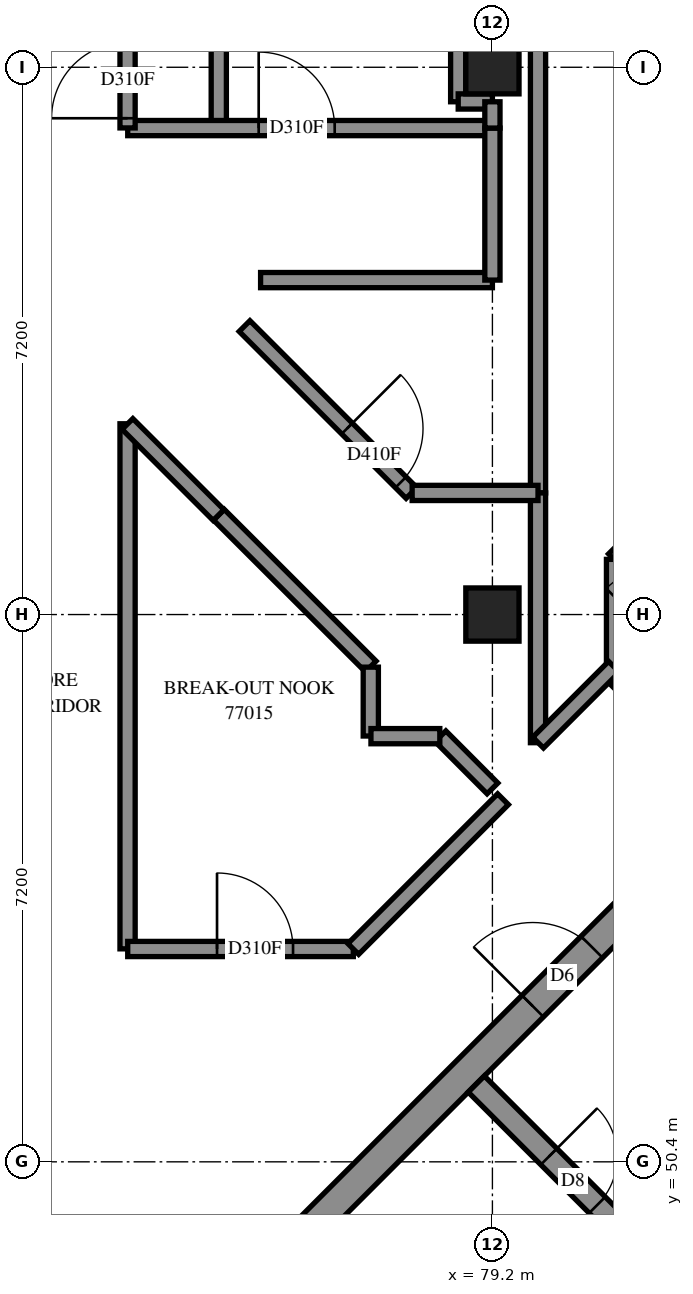
"""IFC4 building model, lengths in metres.
Left out: names, types, materials, properties, quantities, classifications, styles, units other than length and angle.
Written with IfcOpenShell. Run it as: python <this file> out.ifc"""

import sys

from ifc_helpers import new_model, si_unit, direction, frame, frame_2d, origin, origin_2d, place, context, subcontext, project, spatial, rectangle, extrude, element, fill, save


model = new_model("IFC4")
c1 = context("Model", 3, precision=1e-05, world=origin(), true_north=direction((0.0, 1.0)))
c2 = subcontext(c1, "Body", "Model", "MODEL_VIEW")
j1 = project(units=[si_unit("LENGTHUNIT", "METRE"), si_unit("PLANEANGLEUNIT", "RADIAN")], contexts=[c1])
p1 = place(None, origin())
s1 = spatial("IfcSite", under=j1, at=p1, CompositionType="ELEMENT")
p2 = place(p1, origin())
s2 = spatial("IfcBuilding", under=s1, at=p2, CompositionType="ELEMENT")
p3 = place(p2, frame((0.0, 0.0, 281.2)))
s3 = spatial("IfcBuildingStorey", under=s2, at=p3, CompositionType="ELEMENT", Elevation=281.2)
for number, where, z_axis, x_axis in (
    (1, (79.2, 57.6, 0.0), (0.0, 0.0, 1.0), (1.0, 0.0, 0.0)),
    (2, (79.2, 64.8, 0.0), (0.0, 0.0, 1.0), (1.0, 0.0, 0.0)),
):
    element("IfcColumn", number, at=place(p3, frame(where, z_axis=z_axis, x_axis=x_axis)), inside=s3, PredefinedType="COLUMN", context=c2, shape_type="SweptSolid", body=[
        extrude(rectangle(XDim=0.7, YDim=0.7, at=origin_2d()), origin(), (0.0, 0.0, 1.0), 3.1),
    ])
p4 = place(p3, frame((76.513, 49.231, -0.3), z_axis=(0.0, 0.0, 1.0), x_axis=(0.7071067812, 0.7071067812, 0.0)))
e3 = element("IfcWall", 3, at=p4, inside=s3, PredefinedType="SHEAR", context=c2, shape_type="SweptSolid", body=[
    extrude(rectangle(XDim=14.4, YDim=0.4, at=frame_2d((7.2, 0.0))), origin(), (0.0, 0.0, 1.0), 2.7),
])
p5 = place(p4, frame((4.55, 0.0, 0.3)))
e4 = element("IfcOpeningElement", 4, at=p5, cuts=e3, PredefinedType="OPENING", context=c2, shape_type="SweptSolid", body=[
    extrude(rectangle(XDim=1.1, YDim=2.1, at=frame_2d((0.55, 1.05))), frame((0.0, 0.21, 0.0), z_axis=(0.0, -1.0, 0.0), x_axis=(1.0, 0.0, 0.0)), (0.0, 0.0, 1.0), 0.42),
])
p6 = place(p4, frame((11.35, 0.0, 0.3)))
e5 = element("IfcOpeningElement", 5, at=p6, cuts=e3, PredefinedType="OPENING", context=c2, shape_type="SweptSolid", body=[
    extrude(rectangle(XDim=1.1, YDim=2.1, at=frame_2d((0.55, 1.05))), frame((0.0, 0.21, 0.0), z_axis=(0.0, -1.0, 0.0), x_axis=(1.0, 0.0, 0.0)), (0.0, 0.0, 1.0), 0.42),
])
p7 = place(p3, frame((78.988, 51.423, 0.0), z_axis=(0.0, 0.0, 1.0), x_axis=(0.7071067812, -0.7071067812, 0.0)))
e6 = element("IfcWall", 6, at=p7, inside=s3, PredefinedType="SOLIDWALL", context=c2, shape_type="SweptSolid", body=[
    extrude(rectangle(XDim=14.4, YDim=0.3, at=frame_2d((7.2, 0.0))), origin(), (0.0, 0.0, 1.0), 3.1),
])
p8 = place(p7, frame((1.35, 0.0, 0.0)))
e7 = element("IfcOpeningElement", 7, at=p8, cuts=e6, PredefinedType="OPENING", context=c2, shape_type="SweptSolid", body=[
    extrude(rectangle(XDim=0.9, YDim=2.1, at=frame_2d((0.45, 1.05))), frame((0.0, 0.16, 0.0), z_axis=(0.0, -1.0, 0.0), x_axis=(1.0, 0.0, 0.0)), (0.0, 0.0, 1.0), 0.32),
])
p9 = place(p7, frame((4.95, 0.0, 0.0)))
e8 = element("IfcOpeningElement", 8, at=p9, cuts=e6, PredefinedType="OPENING", context=c2, shape_type="SweptSolid", body=[
    extrude(rectangle(XDim=0.9, YDim=2.1, at=frame_2d((0.45, 1.05))), frame((0.0, 0.16, 0.0), z_axis=(0.0, -1.0, 0.0), x_axis=(1.0, 0.0, 0.0)), (0.0, 0.0, 1.0), 0.32),
])
p10 = place(p7, frame((8.55, 0.0, 0.0)))
e9 = element("IfcOpeningElement", 9, at=p10, cuts=e6, PredefinedType="OPENING", context=c2, shape_type="SweptSolid", body=[
    extrude(rectangle(XDim=0.9, YDim=2.1, at=frame_2d((0.45, 1.05))), frame((0.0, 0.16, 0.0), z_axis=(0.0, -1.0, 0.0), x_axis=(1.0, 0.0, 0.0)), (0.0, 0.0, 1.0), 0.32),
])
p11 = place(p7, frame((12.05, 0.0, 0.0)))
e10 = element("IfcOpeningElement", 10, at=p11, cuts=e6, PredefinedType="OPENING", context=c2, shape_type="SweptSolid", body=[
    extrude(rectangle(XDim=1.1, YDim=2.1, at=frame_2d((0.55, 1.05))), frame((0.0, 0.16, 0.0), z_axis=(0.0, -1.0, 0.0), x_axis=(1.0, 0.0, 0.0)), (0.0, 0.0, 1.0), 0.32),
])
p12 = place(p3, frame((79.8, 59.2, 0.0), z_axis=(0.0, 0.0, 1.0), x_axis=(0.0, 1.0, 0.0)))
e11 = element("IfcWall", 11, at=p12, inside=s3, PredefinedType="PARTITIONING", context=c2, shape_type="SweptSolid", body=[
    extrude(rectangle(XDim=13.8, YDim=0.2, at=frame_2d((6.9, 0.0))), origin(), (0.0, 0.0, 1.0), 3.1),
])
p13 = place(p3, frame((80.799, 58.327, 0.0), z_axis=(0.0, 0.0, 1.0), x_axis=(0.7071121647, 0.7071013977, 0.0)))
e12 = element("IfcWall", 12, at=p13, inside=s3, PredefinedType="PARTITIONING", context=c2, shape_type="SweptSolid", body=[
    extrude(rectangle(XDim=9.288, YDim=0.2, at=frame_2d((4.644, 0.0))), origin(), (0.0, 0.0, 1.0), 3.1),
])
p14 = place(p3, frame((75.6, 64.0, 0.0), z_axis=(0.0, 0.0, 1.0), x_axis=(0.0, 1.0, 0.0)))
e13 = element("IfcWall", 13, at=p14, inside=s3, PredefinedType="PARTITIONING", context=c2, shape_type="SweptSolid", body=[
    extrude(rectangle(XDim=8.75, YDim=0.2, at=frame_2d((4.375, 0.0))), origin(), (0.0, 0.0, 1.0), 3.1),
])
p15 = place(p3, frame((80.802, 56.633, 0.0), z_axis=(0.0, 0.0, 1.0), x_axis=(0.7071067812, 0.7071067812, 0.0)))
e14 = element("IfcWall", 14, at=p15, inside=s3, PredefinedType="PARTITIONING", context=c2, shape_type="SweptSolid", body=[
    extrude(rectangle(XDim=8.533, YDim=0.2, at=frame_2d((4.267, 0.0))), origin(), (0.0, 0.0, 1.0), 3.1),
])
p16 = place(p15, frame((0.853, 0.0, 0.0)))
e15 = element("IfcOpeningElement", 15, at=p16, cuts=e14, PredefinedType="OPENING", context=c2, shape_type="SweptSolid", body=[
    extrude(rectangle(XDim=1.0, YDim=2.1, at=frame_2d((0.5, 1.05))), frame((0.0, 0.11, 0.0), z_axis=(0.0, -1.0, 0.0), x_axis=(1.0, 0.0, 0.0)), (0.0, 0.0, 1.0), 0.22),
])
p17 = place(p3, frame((74.4, 53.202, 0.0), z_axis=(0.0, 0.0, 1.0), x_axis=(0.0, 1.0, 0.0)))
e16 = element("IfcWall", 16, at=p17, inside=s3, PredefinedType="PARTITIONING", context=c2, shape_type="SweptSolid", body=[
    extrude(rectangle(XDim=6.908, YDim=0.2, at=frame_2d((3.454, 0.0))), origin(), (0.0, 0.0, 1.0), 3.1),
])
p18 = place(p3, frame((74.402, 64.0, 0.0), z_axis=(0.0, 0.0, 1.0), x_axis=(1.0, 0.0, 0.0)))
e17 = element("IfcWall", 17, at=p18, inside=s3, PredefinedType="PARTITIONING", context=c2, shape_type="SweptSolid", body=[
    extrude(rectangle(XDim=4.798, YDim=0.2, at=frame_2d((2.399, 0.0))), origin(), (0.0, 0.0, 1.0), 3.1),
])
p19 = place(p18, frame((1.723, 0.0, 0.0)))
e18 = element("IfcOpeningElement", 18, at=p19, cuts=e17, PredefinedType="OPENING", context=c2, shape_type="SweptSolid", body=[
    extrude(rectangle(XDim=1.0, YDim=2.1, at=frame_2d((0.5, 1.05))), frame((0.0, 0.11, 0.0), z_axis=(0.0, -1.0, 0.0), x_axis=(1.0, 0.0, 0.0)), (0.0, 0.0, 1.0), 0.22),
])
p20 = place(p3, frame((79.8, 55.914, 0.0), z_axis=(0.0, 0.0, 1.0), x_axis=(0.0, 1.0, 0.0)))
e19 = element("IfcWall", 19, at=p20, inside=s3, PredefinedType="PARTITIONING", context=c2, shape_type="SweptSolid", body=[
    extrude(rectangle(XDim=3.286, YDim=0.2, at=frame_2d((1.643, 0.0))), origin(), (0.0, 0.0, 1.0), 3.1),
])
p21 = place(p3, frame((74.4, 64.002, 0.0), z_axis=(0.0, 0.0, 1.0), x_axis=(0.0, 1.0, 0.0)))
e20 = element("IfcWall", 20, at=p21, inside=s3, PredefinedType="PARTITIONING", context=c2, shape_type="SweptSolid", body=[
    extrude(rectangle(XDim=3.198, YDim=0.2, at=frame_2d((1.599, 0.0))), origin(), (0.0, 0.0, 1.0), 3.1),
])
p22 = place(p21, frame((0.127, 0.0, 0.0)))
e21 = element("IfcOpeningElement", 21, at=p22, cuts=e20, PredefinedType="OPENING", context=c2, shape_type="SweptSolid", body=[
    extrude(rectangle(XDim=1.0, YDim=2.1, at=frame_2d((0.5, 1.05))), frame((0.0, 0.11, 0.0), z_axis=(0.0, -1.0, 0.0), x_axis=(1.0, 0.0, 0.0)), (0.0, 0.0, 1.0), 0.22),
])
p23 = place(p3, frame((75.939, 61.395, 0.0), z_axis=(0.0, 0.0, 1.0), x_axis=(0.7071067812, -0.7071067812, 0.0)))
e22 = element("IfcWall", 22, at=p23, inside=s3, PredefinedType="PARTITIONING", context=c2, shape_type="SweptSolid", body=[
    extrude(rectangle(XDim=3.106, YDim=0.2, at=frame_2d((1.553, 0.0))), origin(), (0.0, 0.0, 1.0), 3.1),
])
p24 = place(p23, frame((1.906, 0.0, 0.0)))
e23 = element("IfcOpeningElement", 23, at=p24, cuts=e22, PredefinedType="OPENING", context=c2, shape_type="SweptSolid", body=[
    extrude(rectangle(XDim=1.0, YDim=2.1, at=frame_2d((0.5, 1.05))), frame((0.0, 0.11, 0.0), z_axis=(0.0, -1.0, 0.0), x_axis=(1.0, 0.0, 0.0)), (0.0, 0.0, 1.0), 0.22),
])
p25 = place(p3, frame((76.15, 62.0, 0.0), z_axis=(0.0, 0.0, 1.0), x_axis=(1.0, 0.0, 0.0)))
e24 = element("IfcWall", 24, at=p25, inside=s3, PredefinedType="PARTITIONING", context=c2, shape_type="SweptSolid", body=[
    extrude(rectangle(XDim=3.05, YDim=0.2, at=frame_2d((1.525, 0.0))), origin(), (0.0, 0.0, 1.0), 3.1),
])
p26 = place(p3, frame((74.402, 53.2, 0.0), z_axis=(0.0, 0.0, 1.0), x_axis=(1.0, 0.0, 0.0)))
e25 = element("IfcWall", 25, at=p26, inside=s3, PredefinedType="PARTITIONING", context=c2, shape_type="SweptSolid", body=[
    extrude(rectangle(XDim=2.968, YDim=0.2, at=frame_2d((1.484, 0.0))), origin(), (0.0, 0.0, 1.0), 3.1),
])
p27 = place(p26, frame((1.175, 0.0, 0.0)))
e26 = element("IfcOpeningElement", 26, at=p27, cuts=e25, PredefinedType="OPENING", context=c2, shape_type="SweptSolid", body=[
    extrude(rectangle(XDim=1.0, YDim=2.1, at=frame_2d((0.5, 1.05))), frame((0.0, 0.11, 0.0), z_axis=(0.0, -1.0, 0.0), x_axis=(1.0, 0.0, 0.0)), (0.0, 0.0, 1.0), 0.22),
])
p28 = place(p3, frame((75.601, 58.913, 0.0), z_axis=(0.0, 0.0, 1.0), x_axis=(0.707460777, -0.7067526081, 0.0)))
e27 = element("IfcWall", 27, at=p28, inside=s3, PredefinedType="PARTITIONING", context=c2, shape_type="SweptSolid", body=[
    extrude(rectangle(XDim=2.824, YDim=0.2, at=frame_2d((1.412, 0.0))), origin(), (0.0, 0.0, 1.0), 3.1),
])
p29 = place(p3, frame((77.37, 53.2, 0.0), z_axis=(0.0, 0.0, 1.0), x_axis=(0.7071067812, 0.7071067812, 0.0)))
e28 = element("IfcWall", 28, at=p29, inside=s3, PredefinedType="PARTITIONING", context=c2, shape_type="SweptSolid", body=[
    extrude(rectangle(XDim=2.786, YDim=0.2, at=frame_2d((1.393, 0.0))), origin(), (0.0, 0.0, 1.0), 3.1),
])
p30 = place(p3, frame((79.2, 62.0, 0.0), z_axis=(0.0, 0.0, 1.0), x_axis=(0.0, 1.0, 0.0)))
e29 = element("IfcWall", 29, at=p30, inside=s3, PredefinedType="PARTITIONING", context=c2, shape_type="SweptSolid", body=[
    extrude(rectangle(XDim=2.0, YDim=0.2, at=frame_2d((1.0, 0.0))), origin(), (0.0, 0.0, 1.0), 3.1),
])
p31 = place(p3, frame((74.399, 60.107, 0.0), z_axis=(0.0, 0.0, 1.0), x_axis=(0.7071067812, -0.7071067812, 0.0)))
e30 = element("IfcWall", 30, at=p31, inside=s3, PredefinedType="PARTITIONING", context=c2, shape_type="SweptSolid", body=[
    extrude(rectangle(XDim=1.694, YDim=0.2, at=frame_2d((0.847, 0.0))), origin(), (0.0, 0.0, 1.0), 3.1),
])
p32 = place(p3, frame((78.144, 59.2, 0.0), z_axis=(0.0, 0.0, 1.0), x_axis=(1.0, 0.0, 0.0)))
e31 = element("IfcWall", 31, at=p32, inside=s3, PredefinedType="PARTITIONING", context=c2, shape_type="SweptSolid", body=[
    extrude(rectangle(XDim=1.656, YDim=0.2, at=frame_2d((0.828, 0.0))), origin(), (0.0, 0.0, 1.0), 3.1),
])
p33 = place(p3, frame((80.8, 56.912, 0.0), z_axis=(0.0, 0.0, 1.0), x_axis=(0.0, 1.0, 0.0)))
e32 = element("IfcWall", 32, at=p33, inside=s3, PredefinedType="PARTITIONING", context=c2, shape_type="SweptSolid", body=[
    extrude(rectangle(XDim=1.414, YDim=0.2, at=frame_2d((0.707, 0.0))), origin(), (0.0, 0.0, 1.0), 3.1),
])
p34 = place(p3, frame((79.801, 55.915, 0.0), z_axis=(0.0, 0.0, 1.0), x_axis=(0.7071067812, 0.7071067812, 0.0)))
e33 = element("IfcWall", 33, at=p34, inside=s3, PredefinedType="PARTITIONING", context=c2, shape_type="SweptSolid", body=[
    extrude(rectangle(XDim=1.411, YDim=0.2, at=frame_2d((0.706, 0.0))), origin(), (0.0, 0.0, 1.0), 3.1),
])
p35 = place(p3, frame((78.517, 55.999, 0.0), z_axis=(0.0, 0.0, 1.0), x_axis=(0.7060737561, -0.7081382993, 0.0)))
e34 = element("IfcWall", 34, at=p35, inside=s3, PredefinedType="PARTITIONING", context=c2, shape_type="SweptSolid", body=[
    extrude(rectangle(XDim=0.969, YDim=0.2, at=frame_2d((0.484, 0.0))), origin(), (0.0, 0.0, 1.0), 3.1),
])
p36 = place(p3, frame((78.75, 64.346, 0.0), z_axis=(0.0, 0.0, 1.0), x_axis=(0.0, 1.0, 0.0)))
e35 = element("IfcWall", 35, at=p36, inside=s3, PredefinedType="PARTITIONING", context=c2, shape_type="SweptSolid", body=[
    extrude(rectangle(XDim=0.908, YDim=0.2, at=frame_2d((0.454, 0.0))), origin(), (0.0, 0.0, 1.0), 3.1),
])
for number, where, z_axis, x_axis in (
    (36, (77.6, 56.002, 0.0), (0.0, 0.0, 1.0), (0.0, 1.0, 0.0)),
    (37, (77.602, 56.0, 0.0), (0.0, 0.0, 1.0), (1.0, 0.0, 0.0)),
):
    element("IfcWall", number, at=place(p3, frame(where, z_axis=z_axis, x_axis=x_axis)), inside=s3, PredefinedType="PARTITIONING", context=c2, shape_type="SweptSolid", body=[
        extrude(rectangle(XDim=0.906, YDim=0.2, at=frame_2d((0.453, 0.0))), origin(), (0.0, 0.0, 1.0), 3.1),
    ])
p37 = place(p3, frame((78.75, 64.35, 0.0), z_axis=(0.0, 0.0, 1.0), x_axis=(1.0, 0.0, 0.0)))
e38 = element("IfcWall", 38, at=p37, inside=s3, PredefinedType="PARTITIONING", context=c2, shape_type="SweptSolid", body=[
    extrude(rectangle(XDim=0.45, YDim=0.2, at=frame_2d((0.225, 0.0))), origin(), (0.0, 0.0, 1.0), 3.1),
])
p38 = place(p3, frame((79.2, 64.0, 0.0), z_axis=(0.0, 0.0, 1.0), x_axis=(0.0, 1.0, 0.0)))
e39 = element("IfcWall", 39, at=p38, inside=s3, PredefinedType="PARTITIONING", context=c2, shape_type="SweptSolid", body=[
    extrude(rectangle(XDim=0.346, YDim=0.2, at=frame_2d((0.173, 0.0))), origin(), (0.0, 0.0, 1.0), 3.1),
])
p39 = place(p5, origin())
e40 = element("IfcDoor", 40, at=p39, inside=s3, OperationType="DOUBLE_DOOR_SINGLE_SWING", PredefinedType="DOOR", context=c2, shape_type="SweptSolid", body=[
    extrude(rectangle(XDim=1.1, YDim=2.1, at=frame_2d((0.55, 1.05))), frame((0.0, 0.025, 0.0), z_axis=(0.0, -1.0, 0.0), x_axis=(1.0, 0.0, 0.0)), (0.0, 0.0, 1.0), 0.05),
])
fill(e4, e40)
p40 = place(p8, origin())
e41 = element("IfcDoor", 41, at=p40, inside=s3, OperationType="SINGLE_SWING_LEFT", PredefinedType="DOOR", context=c2, shape_type="SweptSolid", body=[
    extrude(rectangle(XDim=0.9, YDim=2.1, at=frame_2d((0.45, 1.05))), frame((0.0, 0.025, 0.0), z_axis=(0.0, -1.0, 0.0), x_axis=(1.0, 0.0, 0.0)), (0.0, 0.0, 1.0), 0.05),
])
fill(e7, e41)
p41 = place(p27, origin())
e42 = element("IfcDoor", 42, at=p41, inside=s3, OperationType="SINGLE_SWING_LEFT", PredefinedType="DOOR", context=c2, shape_type="SweptSolid", body=[
    extrude(rectangle(XDim=1.0, YDim=2.1, at=frame_2d((0.5, 1.05))), frame((0.0, 0.025, 0.0), z_axis=(0.0, -1.0, 0.0), x_axis=(1.0, 0.0, 0.0)), (0.0, 0.0, 1.0), 0.05),
])
fill(e26, e42)
p42 = place(p22, origin())
e43 = element("IfcDoor", 43, at=p42, inside=s3, OperationType="SINGLE_SWING_RIGHT", PredefinedType="DOOR", context=c2, shape_type="SweptSolid", body=[
    extrude(rectangle(XDim=1.0, YDim=2.1, at=frame_2d((0.5, 1.05))), frame((0.0, 0.025, 0.0), z_axis=(0.0, -1.0, 0.0), x_axis=(1.0, 0.0, 0.0)), (0.0, 0.0, 1.0), 0.05),
])
fill(e21, e43)
p43 = place(p19, origin())
e44 = element("IfcDoor", 44, at=p43, inside=s3, OperationType="SINGLE_SWING_LEFT", PredefinedType="DOOR", context=c2, shape_type="SweptSolid", body=[
    extrude(rectangle(XDim=1.0, YDim=2.1, at=frame_2d((0.5, 1.05))), frame((0.0, 0.025, 0.0), z_axis=(0.0, -1.0, 0.0), x_axis=(1.0, 0.0, 0.0)), (0.0, 0.0, 1.0), 0.05),
])
fill(e18, e44)
p44 = place(p24, origin())
e45 = element("IfcDoor", 45, at=p44, inside=s3, OperationType="SINGLE_SWING_LEFT", PredefinedType="DOOR", context=c2, shape_type="SweptSolid", body=[
    extrude(rectangle(XDim=1.0, YDim=2.1, at=frame_2d((0.5, 1.05))), frame((0.0, 0.025, 0.0), z_axis=(0.0, -1.0, 0.0), x_axis=(1.0, 0.0, 0.0)), (0.0, 0.0, 1.0), 0.05),
])
fill(e23, e45)
save(model, sys.argv[1])
